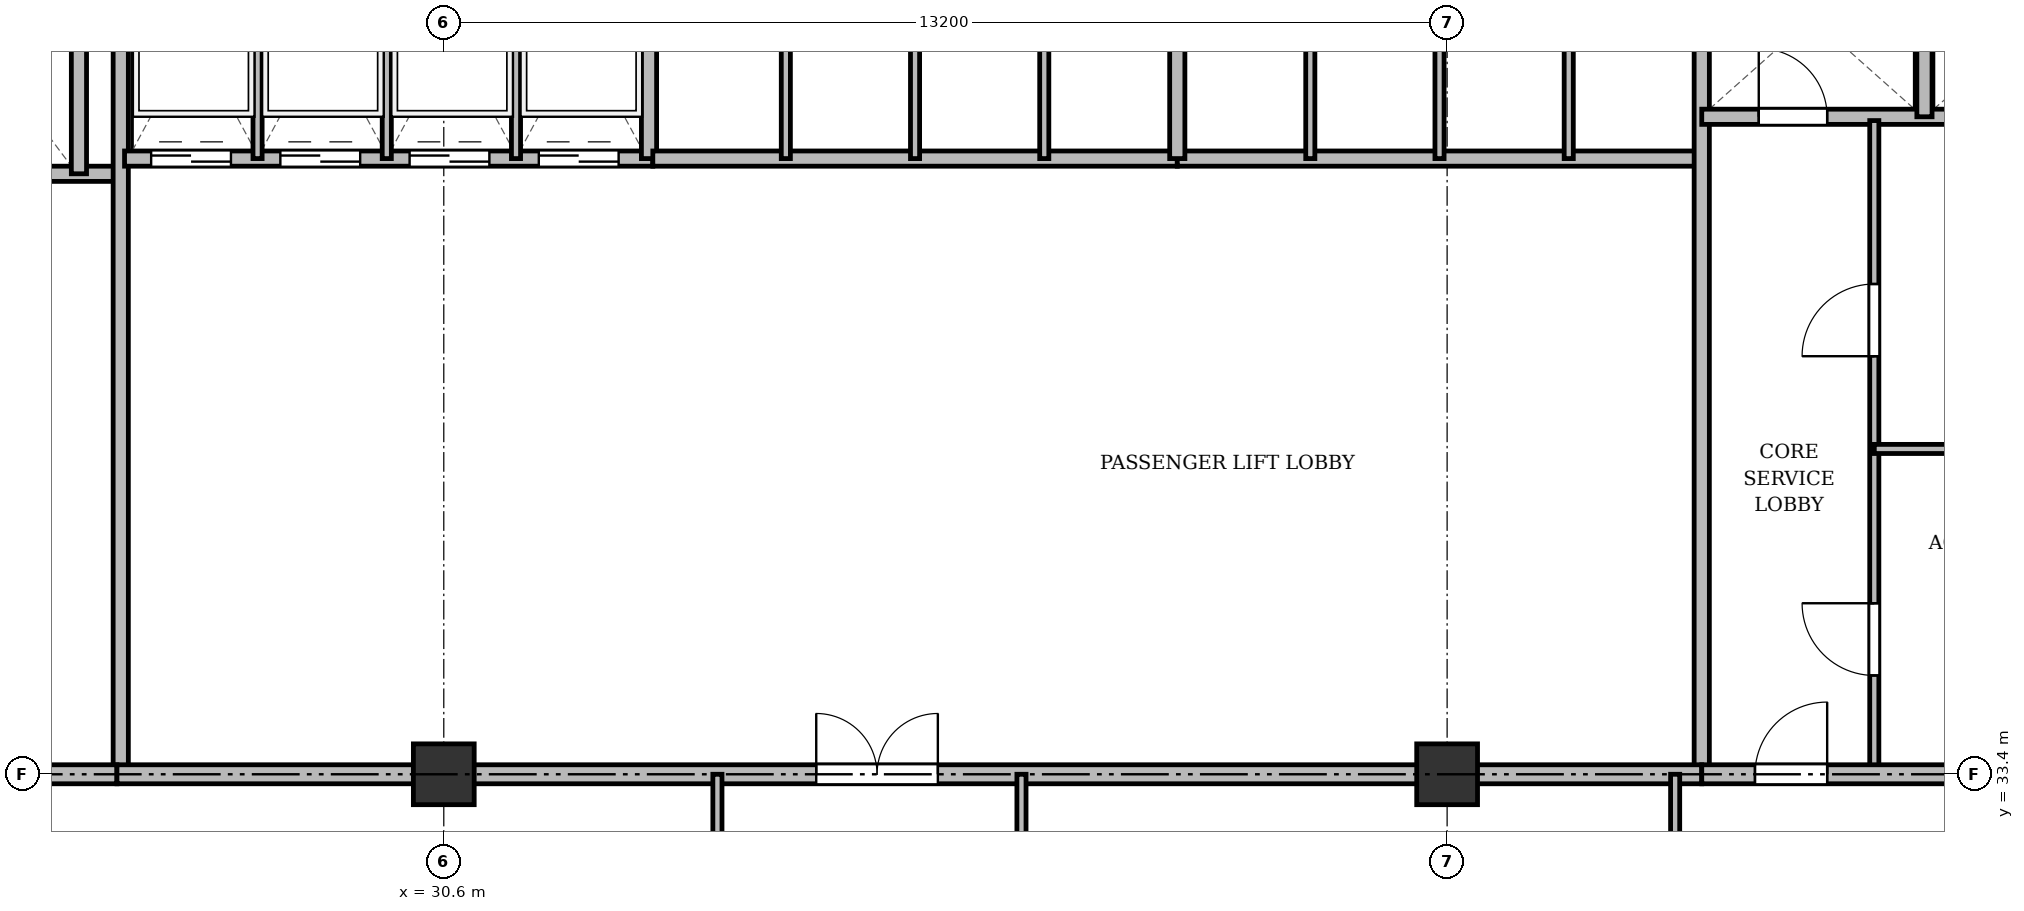
"""IFC4 building model, lengths in metres.
Left out: names, types, materials, properties, quantities, classifications, styles, units other than length and angle.
Written with IfcOpenShell. Run it as: python <this file> out.ifc"""

import sys

from ifc_helpers import new_model, si_unit, direction, frame, frame_2d, origin, origin_2d, place, context, subcontext, project, spatial, rectangle, extrude, source, transform, mapped, element, fill, save


model = new_model("IFC4")
c1 = context("Model", 3, precision=1e-05, world=origin(), true_north=direction((0.0, 1.0)))
c2 = subcontext(c1, "Body", "Model", "MODEL_VIEW")
j1 = project(units=[si_unit("LENGTHUNIT", "METRE"), si_unit("PLANEANGLEUNIT", "RADIAN")], contexts=[c1])
p1 = place(None, origin())
s1 = spatial("IfcSite", under=j1, at=p1, CompositionType="ELEMENT")
p2 = place(p1, origin())
s2 = spatial("IfcBuilding", under=s1, at=p2, CompositionType="ELEMENT")
p3 = place(p2, frame((0.0, 0.0, 106.9)))
s3 = spatial("IfcBuildingStorey", under=s2, at=p3, CompositionType="ELEMENT", Elevation=106.9)
m1 = source(origin(), c2, "Body", "SweptSolid", [
    extrude(rectangle(XDim=0.8, YDim=0.8, at=origin_2d()), origin(), (0.0, 0.0, 1.0), 3.6),
])
for number, where, z_axis, x_axis in (
    (1, (30.6, 33.4, 0.0), (0.0, 0.0, 1.0), (1.0, 0.0, 0.0)),
    (2, (43.8, 33.4, 0.0), (0.0, 0.0, 1.0), (1.0, 0.0, 0.0)),
):
    element("IfcColumn", number, at=place(p3, frame(where, z_axis=z_axis, x_axis=x_axis)), inside=s3, PredefinedType="COLUMN", context=c2, shape_type="MappedRepresentation", body=[
        mapped(m1, transform((0.0, 0.0, 0.0), x_axis=(1.0, 0.0, 0.0), y_axis=(0.0, 1.0, 0.0), z_axis=(0.0, 0.0, 1.0), scale=1.0)),
    ])
p4 = place(p3, frame((19.55, 41.3, 0.0), z_axis=(0.0, 0.0, 1.0), x_axis=(1.0, 0.0, 0.0)))
e3 = element("IfcWall", 3, at=p4, inside=s3, PredefinedType="SOLIDWALL", context=c2, shape_type="SweptSolid", body=[
    extrude(rectangle(XDim=6.75, YDim=0.2, at=frame_2d((3.375, 0.0))), origin(), (0.0, 0.0, 1.0), 3.34),
])
p5 = place(p4, frame((1.7, 0.0, 0.0)))
e4 = element("IfcOpeningElement", 4, at=p5, cuts=e3, PredefinedType="OPENING", context=c2, shape_type="SweptSolid", body=[
    extrude(rectangle(XDim=1.1, YDim=2.15, at=frame_2d((0.55, 1.075))), frame((0.0, 0.11, 0.0), z_axis=(0.0, -1.0, 0.0), x_axis=(1.0, 0.0, 0.0)), (0.0, 0.0, 1.0), 0.22),
])
p6 = place(p4, frame((4.4, 0.0, 0.0)))
e5 = element("IfcOpeningElement", 5, at=p6, cuts=e3, PredefinedType="OPENING", context=c2, shape_type="SweptSolid", body=[
    extrude(rectangle(XDim=1.1, YDim=2.15, at=frame_2d((0.55, 1.075))), frame((0.0, 0.11, 0.0), z_axis=(0.0, -1.0, 0.0), x_axis=(1.0, 0.0, 0.0)), (0.0, 0.0, 1.0), 0.22),
])
p7 = place(p3, frame((25.8, 41.3, 0.0), z_axis=(0.0, 0.0, 1.0), x_axis=(0.0, 1.0, 0.0)))
e6 = element("IfcWall", 6, at=p7, inside=s3, PredefinedType="SOLIDWALL", context=c2, shape_type="SweptSolid", body=[
    extrude(rectangle(XDim=3.4, YDim=0.2, at=frame_2d((1.7, 0.0))), origin(), (0.0, 0.0, 1.0), 3.34),
])
p8 = place(p3, frame((26.35, 33.4, 0.0), z_axis=(0.0, 0.0, 1.0), x_axis=(0.0, 1.0, 0.0)))
e7 = element("IfcWall", 7, at=p8, inside=s3, PredefinedType="SOLIDWALL", context=c2, shape_type="SweptSolid", body=[
    extrude(rectangle(XDim=11.3, YDim=0.2, at=frame_2d((5.65, 0.0))), origin(), (0.0, 0.0, 1.0), 2.752),
])
p9 = place(p3, frame((19.5, 33.4, 0.0), z_axis=(0.0, 0.0, 1.0), x_axis=(1.0, 0.0, 0.0)))
e8 = element("IfcWall", 8, at=p9, inside=s3, PredefinedType="PARTITIONING", context=c2, shape_type="SweptSolid", body=[
    extrude(rectangle(XDim=6.8, YDim=0.25, at=frame_2d((3.4, 0.0))), origin(), (0.0, 0.0, 1.0), 2.752),
])
p10 = place(p9, frame((0.75, 0.0, 0.0)))
e9 = element("IfcOpeningElement", 9, at=p10, cuts=e8, PredefinedType="OPENING", context=c2, shape_type="SweptSolid", body=[
    extrude(rectangle(XDim=1.6, YDim=2.2, at=frame_2d((0.8, 1.1))), frame((0.0, 0.135, 0.0), z_axis=(0.0, -1.0, 0.0), x_axis=(1.0, 0.0, 0.0)), (0.0, 0.0, 1.0), 0.27),
])
p11 = place(p3, frame((26.4, 41.5, 0.0), z_axis=(0.0, 0.0, 1.0), x_axis=(1.0, 0.0, 0.0)))
e10 = element("IfcWall", 10, at=p11, inside=s3, PredefinedType="SOLIDWALL", context=c2, shape_type="SweptSolid", body=[
    extrude(rectangle(XDim=6.95, YDim=0.2, at=frame_2d((3.475, 0.0))), origin(), (0.0, 0.0, 1.0), 3.34),
])
p12 = place(p11, frame((0.35, 0.0, 0.0)))
e11 = element("IfcOpeningElement", 11, at=p12, cuts=e10, PredefinedType="OPENING", context=c2, shape_type="SweptSolid", body=[
    extrude(rectangle(XDim=1.05, YDim=2.15, at=frame_2d((0.525, 1.075))), frame((0.0, 0.11, 0.0), z_axis=(0.0, -1.0, 0.0), x_axis=(1.0, 0.0, 0.0)), (0.0, 0.0, 1.0), 0.22),
])
p13 = place(p11, frame((2.05, 0.0, 0.0)))
e12 = element("IfcOpeningElement", 12, at=p13, cuts=e10, PredefinedType="OPENING", context=c2, shape_type="SweptSolid", body=[
    extrude(rectangle(XDim=1.05, YDim=2.15, at=frame_2d((0.525, 1.075))), frame((0.0, 0.11, 0.0), z_axis=(0.0, -1.0, 0.0), x_axis=(1.0, 0.0, 0.0)), (0.0, 0.0, 1.0), 0.22),
])
p14 = place(p11, frame((3.75, 0.0, 0.0)))
e13 = element("IfcOpeningElement", 13, at=p14, cuts=e10, PredefinedType="OPENING", context=c2, shape_type="SweptSolid", body=[
    extrude(rectangle(XDim=1.05, YDim=2.15, at=frame_2d((0.525, 1.075))), frame((0.0, 0.11, 0.0), z_axis=(0.0, -1.0, 0.0), x_axis=(1.0, 0.0, 0.0)), (0.0, 0.0, 1.0), 0.22),
])
p15 = place(p11, frame((5.45, 0.0, 0.0)))
e14 = element("IfcOpeningElement", 14, at=p15, cuts=e10, PredefinedType="OPENING", context=c2, shape_type="SweptSolid", body=[
    extrude(rectangle(XDim=1.05, YDim=2.15, at=frame_2d((0.525, 1.075))), frame((0.0, 0.11, 0.0), z_axis=(0.0, -1.0, 0.0), x_axis=(1.0, 0.0, 0.0)), (0.0, 0.0, 1.0), 0.22),
])
p16 = place(p3, frame((33.3, 41.5, 0.0), z_axis=(0.0, 0.0, 1.0), x_axis=(0.0, 1.0, 0.0)))
e15 = element("IfcWall", 15, at=p16, inside=s3, PredefinedType="SOLIDWALL", context=c2, shape_type="SweptSolid", body=[
    extrude(rectangle(XDim=3.2, YDim=0.2, at=frame_2d((1.6, 0.0))), origin(), (0.0, 0.0, 1.0), 3.34),
])
for number, where, z_axis, x_axis in (
    (16, (28.15, 41.5, 0.0), (0.0, 0.0, 1.0), (0.0, 1.0, 0.0)),
    (17, (29.85, 41.5, 0.0), (0.0, 0.0, 1.0), (0.0, 1.0, 0.0)),
    (18, (31.55, 41.5, 0.0), (0.0, 0.0, 1.0), (0.0, 1.0, 0.0)),
):
    element("IfcWall", number, at=place(p3, frame(where, z_axis=z_axis, x_axis=x_axis)), inside=s3, PredefinedType="PARTITIONING", context=c2, shape_type="SweptSolid", body=[
        extrude(rectangle(XDim=3.2, YDim=0.12, at=frame_2d((1.6, 0.0))), origin(), (0.0, 0.0, 1.0), 3.34),
    ])
p17 = place(p3, frame((33.35, 41.5, 0.0), z_axis=(0.0, 0.0, 1.0), x_axis=(1.0, 0.0, 0.0)))
e19 = element("IfcWall", 19, at=p17, inside=s3, PredefinedType="SOLIDWALL", context=c2, shape_type="SweptSolid", body=[
    extrude(rectangle(XDim=6.9, YDim=0.2, at=frame_2d((3.45, 0.0))), origin(), (0.0, 0.0, 1.0), 3.34),
])
for number, where, z_axis, x_axis in (
    (20, (35.1, 41.5, 0.0), (0.0, 0.0, 1.0), (0.0, 1.0, 0.0)),
    (21, (36.8, 41.5, 0.0), (0.0, 0.0, 1.0), (0.0, 1.0, 0.0)),
    (22, (38.5, 41.5, 0.0), (0.0, 0.0, 1.0), (0.0, 1.0, 0.0)),
):
    element("IfcWall", number, at=place(p3, frame(where, z_axis=z_axis, x_axis=x_axis)), inside=s3, PredefinedType="PARTITIONING", context=c2, shape_type="SweptSolid", body=[
        extrude(rectangle(XDim=3.2, YDim=0.12, at=frame_2d((1.6, 0.0))), origin(), (0.0, 0.0, 1.0), 3.34),
    ])
p18 = place(p3, frame((40.25, 41.5, 0.0), z_axis=(0.0, 0.0, 1.0), x_axis=(1.0, 0.0, 0.0)))
e23 = element("IfcWall", 23, at=p18, inside=s3, PredefinedType="SOLIDWALL", context=c2, shape_type="SweptSolid", body=[
    extrude(rectangle(XDim=6.9, YDim=0.2, at=frame_2d((3.45, 0.0))), origin(), (0.0, 0.0, 1.0), 2.84),
])
p19 = place(p3, frame((40.25, 41.5, 0.0), z_axis=(0.0, 0.0, 1.0), x_axis=(0.0, 1.0, 0.0)))
e24 = element("IfcWall", 24, at=p19, inside=s3, PredefinedType="SOLIDWALL", context=c2, shape_type="SweptSolid", body=[
    extrude(rectangle(XDim=3.2, YDim=0.2, at=frame_2d((1.6, 0.0))), origin(), (0.0, 0.0, 1.0), 3.34),
])
p20 = place(p3, frame((42.0, 41.5, 0.0), z_axis=(0.0, 0.0, 1.0), x_axis=(0.0, 1.0, 0.0)))
e25 = element("IfcWall", 25, at=p20, inside=s3, PredefinedType="PARTITIONING", context=c2, shape_type="SweptSolid", body=[
    extrude(rectangle(XDim=3.2, YDim=0.12, at=frame_2d((1.6, 0.0))), origin(), (0.0, 0.0, 1.0), 3.34),
])
p21 = place(p3, frame((43.7, 41.5, 0.0), z_axis=(0.0, 0.0, 1.0), x_axis=(0.0, 1.0, 0.0)))
e26 = element("IfcWall", 26, at=p21, inside=s3, PredefinedType="PARTITIONING", context=c2, shape_type="SweptSolid", body=[
    extrude(rectangle(XDim=3.2, YDim=0.12, at=frame_2d((1.6, 0.0))), origin(), (0.0, 0.0, 1.0), 2.84),
])
p22 = place(p3, frame((45.4, 41.5, 0.0), z_axis=(0.0, 0.0, 1.0), x_axis=(0.0, 1.0, 0.0)))
e27 = element("IfcWall", 27, at=p22, inside=s3, PredefinedType="PARTITIONING", context=c2, shape_type="SweptSolid", body=[
    extrude(rectangle(XDim=3.2, YDim=0.12, at=frame_2d((1.6, 0.0))), origin(), (0.0, 0.0, 1.0), 3.34),
])
p23 = place(p3, frame((47.15, 33.4, 0.0), z_axis=(0.0, 0.0, 1.0), x_axis=(0.0, 1.0, 0.0)))
e28 = element("IfcWall", 28, at=p23, inside=s3, PredefinedType="SOLIDWALL", context=c2, shape_type="SweptSolid", body=[
    extrude(rectangle(XDim=11.3, YDim=0.2, at=frame_2d((5.65, 0.0))), origin(), (0.0, 0.0, 1.0), 2.752),
])
p24 = place(p3, frame((26.3, 33.4, 0.0), z_axis=(0.0, 0.0, 1.0), x_axis=(1.0, 0.0, 0.0)))
e29 = element("IfcWall", 29, at=p24, inside=s3, PredefinedType="PARTITIONING", context=c2, shape_type="SweptSolid", body=[
    extrude(rectangle(XDim=20.85, YDim=0.25, at=frame_2d((10.425, 0.0))), origin(), (0.0, 0.0, 1.0), 2.752),
])
p25 = place(p24, frame((9.2, 0.0, 0.0)))
e30 = element("IfcOpeningElement", 30, at=p25, cuts=e29, PredefinedType="OPENING", context=c2, shape_type="SweptSolid", body=[
    extrude(rectangle(XDim=1.6, YDim=2.2, at=frame_2d((0.8, 1.1))), frame((0.0, 0.135, 0.0), z_axis=(0.0, -1.0, 0.0), x_axis=(1.0, 0.0, 0.0)), (0.0, 0.0, 1.0), 0.27),
])
p26 = place(p3, frame((47.15, 42.05, 0.0), z_axis=(0.0, 0.0, 1.0), x_axis=(1.0, 0.0, 0.0)))
e31 = element("IfcWall", 31, at=p26, inside=s3, PredefinedType="SOLIDWALL", context=c2, shape_type="SweptSolid", body=[
    extrude(rectangle(XDim=7.85, YDim=0.2, at=frame_2d((3.925, 0.0))), origin(), (0.0, 0.0, 1.0), 2.84),
])
p27 = place(p26, frame((0.75, 0.0, 0.0)))
e32 = element("IfcOpeningElement", 32, at=p27, cuts=e31, PredefinedType="OPENING", context=c2, shape_type="SweptSolid", body=[
    extrude(rectangle(XDim=0.9, YDim=2.1, at=frame_2d((0.45, 1.05))), frame((0.0, 0.11, 0.0), z_axis=(0.0, -1.0, 0.0), x_axis=(1.0, 0.0, 0.0)), (0.0, 0.0, 1.0), 0.22),
])
p28 = place(p26, frame((3.85, 0.0, 0.0)))
e33 = element("IfcOpeningElement", 33, at=p28, cuts=e31, PredefinedType="OPENING", context=c2, shape_type="SweptSolid", body=[
    extrude(rectangle(XDim=0.9, YDim=2.1, at=frame_2d((0.45, 1.05))), frame((0.0, 0.11, 0.0), z_axis=(0.0, -1.0, 0.0), x_axis=(1.0, 0.0, 0.0)), (0.0, 0.0, 1.0), 0.22),
])
p29 = place(p3, frame((50.08, 42.05, 0.0), z_axis=(0.0, 0.0, 1.0), x_axis=(0.0, 1.0, 0.0)))
e34 = element("IfcWall", 34, at=p29, inside=s3, PredefinedType="SOLIDWALL", context=c2, shape_type="SweptSolid", body=[
    extrude(rectangle(XDim=2.65, YDim=0.2, at=frame_2d((1.325, 0.0))), origin(), (0.0, 0.0, 1.0), 3.34),
])
p30 = place(p3, frame((49.42, 33.4, 0.0), z_axis=(0.0, 0.0, 1.0), x_axis=(0.0, 1.0, 0.0)))
e35 = element("IfcWall", 35, at=p30, inside=s3, PredefinedType="PARTITIONING", context=c2, shape_type="SweptSolid", body=[
    extrude(rectangle(XDim=8.6, YDim=0.12, at=frame_2d((4.3, 0.0))), origin(), (0.0, 0.0, 1.0), 2.752),
])
p31 = place(p30, frame((1.3, 0.0, 0.0)))
e36 = element("IfcOpeningElement", 36, at=p31, cuts=e35, PredefinedType="OPENING", context=c2, shape_type="SweptSolid", body=[
    extrude(rectangle(XDim=0.95, YDim=2.15, at=frame_2d((0.475, 1.075))), frame((0.0, 0.07, 0.0), z_axis=(0.0, -1.0, 0.0), x_axis=(1.0, 0.0, 0.0)), (0.0, 0.0, 1.0), 0.14),
])
p32 = place(p30, frame((5.5, 0.0, 0.0)))
e37 = element("IfcOpeningElement", 37, at=p32, cuts=e35, PredefinedType="OPENING", context=c2, shape_type="SweptSolid", body=[
    extrude(rectangle(XDim=0.95, YDim=2.15, at=frame_2d((0.475, 1.075))), frame((0.0, 0.07, 0.0), z_axis=(0.0, -1.0, 0.0), x_axis=(1.0, 0.0, 0.0)), (0.0, 0.0, 1.0), 0.14),
])
p33 = place(p3, frame((49.42, 37.68, 0.0), z_axis=(0.0, 0.0, 1.0), x_axis=(1.0, 0.0, 0.0)))
e38 = element("IfcWall", 38, at=p33, inside=s3, PredefinedType="PARTITIONING", context=c2, shape_type="SweptSolid", body=[
    extrude(rectangle(XDim=3.03, YDim=0.12, at=frame_2d((1.515, 0.0))), origin(), (0.0, 0.0, 1.0), 2.84),
])
p34 = place(p3, frame((47.15, 33.4, 0.0), z_axis=(0.0, 0.0, 1.0), x_axis=(1.0, 0.0, 0.0)))
e39 = element("IfcWall", 39, at=p34, inside=s3, PredefinedType="PARTITIONING", context=c2, shape_type="SweptSolid", body=[
    extrude(rectangle(XDim=11.15, YDim=0.25, at=frame_2d((5.575, 0.0))), origin(), (0.0, 0.0, 1.0), 2.752),
])
p35 = place(p34, frame((0.7, 0.0, 0.0)))
e40 = element("IfcOpeningElement", 40, at=p35, cuts=e39, PredefinedType="OPENING", context=c2, shape_type="SweptSolid", body=[
    extrude(rectangle(XDim=0.95, YDim=2.15, at=frame_2d((0.475, 1.075))), frame((0.0, 0.135, 0.0), z_axis=(0.0, -1.0, 0.0), x_axis=(1.0, 0.0, 0.0)), (0.0, 0.0, 1.0), 0.27),
])
p36 = place(p34, frame((6.0, 0.0, 0.0)))
e41 = element("IfcOpeningElement", 41, at=p36, cuts=e39, PredefinedType="OPENING", context=c2, shape_type="SweptSolid", body=[
    extrude(rectangle(XDim=1.2, YDim=2.15, at=frame_2d((0.6, 1.075))), frame((0.0, 0.135, 0.0), z_axis=(0.0, -1.0, 0.0), x_axis=(1.0, 0.0, 0.0)), (0.0, 0.0, 1.0), 0.27),
])
for number, where, z_axis, x_axis in (
    (42, (34.2, 29.8, 0.0), (0.0, 0.0, 1.0), (0.0, 1.0, 0.0)),
    (43, (38.2, 29.8, 0.0), (0.0, 0.0, 1.0), (0.0, 1.0, 0.0)),
    (44, (46.8, 29.8, 0.0), (0.0, 0.0, 1.0), (0.0, 1.0, 0.0)),
):
    element("IfcWall", number, at=place(p3, frame(where, z_axis=z_axis, x_axis=x_axis)), inside=s3, PredefinedType="PARTITIONING", context=c2, shape_type="SweptSolid", body=[
        extrude(rectangle(XDim=3.6, YDim=0.12, at=frame_2d((1.8, 0.0))), origin(), (0.0, 0.0, 1.0), 2.752),
    ])
m2 = source(origin(), c2, "Body", "SweptSolid", [
    extrude(rectangle(XDim=1.05, YDim=2.15, at=frame_2d((0.525, 1.075))), frame((0.0, 0.025, 0.0), z_axis=(0.0, -1.0, 0.0), x_axis=(1.0, 0.0, 0.0)), (0.0, 0.0, 1.0), 0.05),
])
p37 = place(p12, origin())
e45 = element("IfcDoor", 45, at=p37, inside=s3, OperationType="DOUBLE_DOOR_SLIDING", PredefinedType="DOOR", context=c2, shape_type="MappedRepresentation", body=[
    mapped(m2, transform((0.0, 0.0, 0.0), x_axis=(1.0, 0.0, 0.0), y_axis=(0.0, 1.0, 0.0), z_axis=(0.0, 0.0, 1.0), scale=1.0)),
])
fill(e11, e45)
p38 = place(p13, origin())
e46 = element("IfcDoor", 46, at=p38, inside=s3, OperationType="DOUBLE_DOOR_SLIDING", PredefinedType="DOOR", context=c2, shape_type="MappedRepresentation", body=[
    mapped(m2, transform((0.0, 0.0, 0.0), x_axis=(1.0, 0.0, 0.0), y_axis=(0.0, 1.0, 0.0), z_axis=(0.0, 0.0, 1.0), scale=1.0)),
])
fill(e12, e46)
p39 = place(p14, origin())
e47 = element("IfcDoor", 47, at=p39, inside=s3, OperationType="DOUBLE_DOOR_SLIDING", PredefinedType="DOOR", context=c2, shape_type="MappedRepresentation", body=[
    mapped(m2, transform((0.0, 0.0, 0.0), x_axis=(1.0, 0.0, 0.0), y_axis=(0.0, 1.0, 0.0), z_axis=(0.0, 0.0, 1.0), scale=1.0)),
])
fill(e13, e47)
p40 = place(p15, origin())
e48 = element("IfcDoor", 48, at=p40, inside=s3, OperationType="DOUBLE_DOOR_SLIDING", PredefinedType="DOOR", context=c2, shape_type="MappedRepresentation", body=[
    mapped(m2, transform((0.0, 0.0, 0.0), x_axis=(1.0, 0.0, 0.0), y_axis=(0.0, 1.0, 0.0), z_axis=(0.0, 0.0, 1.0), scale=1.0)),
])
fill(e14, e48)
m3 = source(origin(), c2, "Body", "SweptSolid", [
    extrude(rectangle(XDim=1.6, YDim=2.2, at=frame_2d((0.8, 1.1))), frame((0.0, 0.025, 0.0), z_axis=(0.0, -1.0, 0.0), x_axis=(1.0, 0.0, 0.0)), (0.0, 0.0, 1.0), 0.05),
])
p41 = place(p25, origin())
e49 = element("IfcDoor", 49, at=p41, inside=s3, OperationType="DOUBLE_DOOR_SINGLE_SWING", PredefinedType="DOOR", context=c2, shape_type="MappedRepresentation", body=[
    mapped(m3, transform((0.0, 0.0, 0.0), x_axis=(1.0, 0.0, 0.0), y_axis=(0.0, 1.0, 0.0), z_axis=(0.0, 0.0, 1.0), scale=1.0)),
])
fill(e30, e49)
m4 = source(origin(), c2, "Body", "SweptSolid", [
    extrude(rectangle(XDim=0.9, YDim=2.1, at=frame_2d((0.45, 1.05))), frame((0.0, 0.025, 0.0), z_axis=(0.0, -1.0, 0.0), x_axis=(1.0, 0.0, 0.0)), (0.0, 0.0, 1.0), 0.05),
])
p42 = place(p27, origin())
e50 = element("IfcDoor", 50, at=p42, inside=s3, OperationType="SINGLE_SWING_LEFT", PredefinedType="DOOR", context=c2, shape_type="MappedRepresentation", body=[
    mapped(m4, transform((0.0, 0.0, 0.0), x_axis=(1.0, 0.0, 0.0), y_axis=(0.0, 1.0, 0.0), z_axis=(0.0, 0.0, 1.0), scale=1.0)),
])
fill(e32, e50)
m5 = source(origin(), c2, "Body", "SweptSolid", [
    extrude(rectangle(XDim=0.95, YDim=2.15, at=frame_2d((0.475, 1.075))), frame((0.0, 0.025, 0.0), z_axis=(0.0, -1.0, 0.0), x_axis=(1.0, 0.0, 0.0)), (0.0, 0.0, 1.0), 0.05),
])
p43 = place(p31, origin())
e51 = element("IfcDoor", 51, at=p43, inside=s3, OperationType="SINGLE_SWING_RIGHT", PredefinedType="DOOR", context=c2, shape_type="MappedRepresentation", body=[
    mapped(m5, transform((0.0, 0.0, 0.0), x_axis=(1.0, 0.0, 0.0), y_axis=(0.0, 1.0, 0.0), z_axis=(0.0, 0.0, 1.0), scale=1.0)),
])
fill(e36, e51)
p44 = place(p32, origin())
e52 = element("IfcDoor", 52, at=p44, inside=s3, OperationType="SINGLE_SWING_LEFT", PredefinedType="DOOR", context=c2, shape_type="MappedRepresentation", body=[
    mapped(m5, transform((0.0, 0.0, 0.0), x_axis=(1.0, 0.0, 0.0), y_axis=(0.0, 1.0, 0.0), z_axis=(0.0, 0.0, 1.0), scale=1.0)),
])
fill(e37, e52)
p45 = place(p35, origin())
e53 = element("IfcDoor", 53, at=p45, inside=s3, OperationType="SINGLE_SWING_RIGHT", PredefinedType="DOOR", context=c2, shape_type="MappedRepresentation", body=[
    mapped(m5, transform((0.0, 0.0, 0.0), x_axis=(1.0, 0.0, 0.0), y_axis=(0.0, 1.0, 0.0), z_axis=(0.0, 0.0, 1.0), scale=1.0)),
])
fill(e40, e53)
save(model, sys.argv[1])
